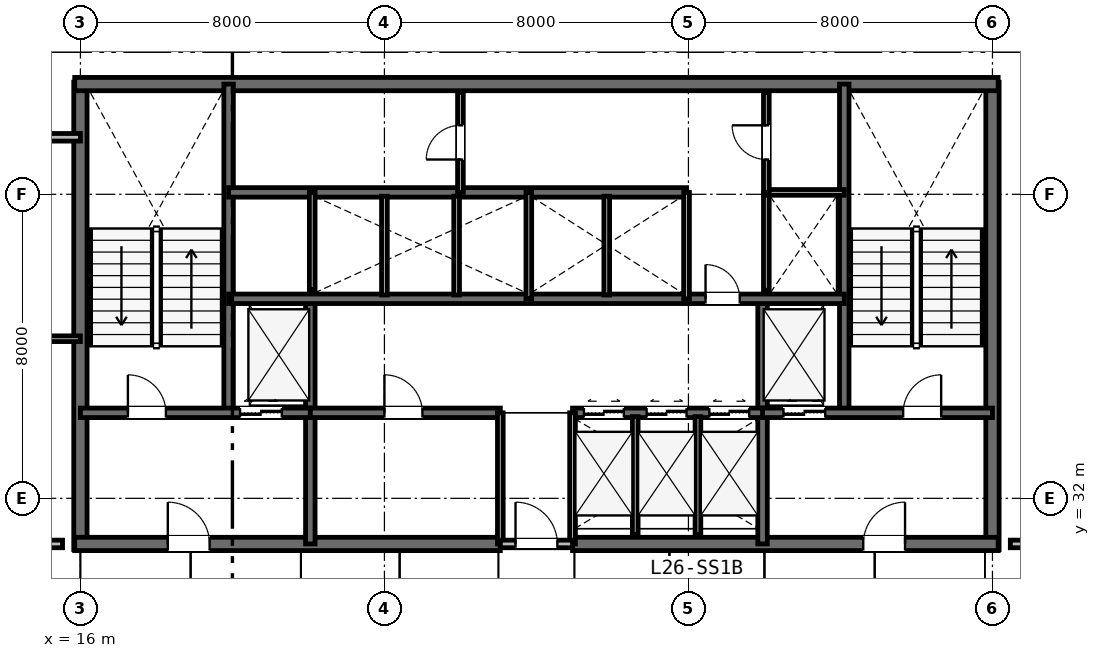
"""IFC4 building model, lengths in metres.
Left out: names, types, materials, properties, quantities, classifications, styles, units other than length and angle.
Written with IfcOpenShell. Run it as: python <this file> out.ifc"""

import sys

from ifc_helpers import new_model, si_unit, direction, frame, frame_2d, origin, place, context, subcontext, project, spatial, rectangle, extrude, element, fill, save


model = new_model("IFC4")
c1 = context("Model", 3, precision=1e-05, world=origin(), true_north=direction((0.0, 1.0)))
c2 = subcontext(c1, "Body", "Model", "MODEL_VIEW")
j1 = project(units=[si_unit("LENGTHUNIT", "METRE"), si_unit("PLANEANGLEUNIT", "RADIAN")], contexts=[c1])
p1 = place(None, origin())
s1 = spatial("IfcSite", under=j1, at=p1, CompositionType="ELEMENT")
p2 = place(p1, origin())
s2 = spatial("IfcBuilding", under=s1, at=p2, CompositionType="ELEMENT")
p3 = place(p2, frame((0.0, 0.0, 104.4)))
s3 = spatial("IfcBuildingStorey", under=s2, at=p3, CompositionType="ELEMENT", Elevation=104.4)
for number, where, z_axis, x_axis in (
    (1, (16.0, 30.65, 0.0), (0.0, 0.0, 1.0), (0.0, 1.0, 0.0)),
    (2, (40.0, 30.65, 0.0), (0.0, 0.0, 1.0), (0.0, 1.0, 0.0)),
):
    element("IfcWall", number, at=place(p3, frame(where, z_axis=z_axis, x_axis=x_axis)), inside=s3, PredefinedType="SHEAR", context=c2, shape_type="SweptSolid", body=[
        extrude(rectangle(XDim=12.3, YDim=0.35, at=frame_2d((6.15, 0.0))), origin(), (0.0, 0.0, 1.0), 3.6),
    ])
p4 = place(p3, frame((15.85, 42.9, 0.0), z_axis=(0.0, 0.0, 1.0), x_axis=(1.0, 0.0, 0.0)))
e3 = element("IfcWall", 3, at=p4, inside=s3, PredefinedType="SHEAR", context=c2, shape_type="SweptSolid", body=[
    extrude(rectangle(XDim=24.3, YDim=0.35, at=frame_2d((12.15, 0.0))), origin(), (0.0, 0.0, 1.0), 3.6),
])
p5 = place(p3, frame((15.85, 30.8, 0.0), z_axis=(0.0, 0.0, 1.0), x_axis=(1.0, 0.0, 0.0)))
e4 = element("IfcWall", 4, at=p5, inside=s3, PredefinedType="SHEAR", context=c2, shape_type="SweptSolid", body=[
    extrude(rectangle(XDim=11.2, YDim=0.35, at=frame_2d((5.6, 0.0))), origin(), (0.0, 0.0, 1.0), 3.6),
])
p6 = place(p5, frame((2.45, 0.0, 0.0)))
e5 = element("IfcOpeningElement", 5, at=p6, cuts=e4, PredefinedType="OPENING", context=c2, shape_type="SweptSolid", body=[
    extrude(rectangle(XDim=1.1, YDim=2.15, at=frame_2d((0.55, 1.075))), frame((0.0, 0.185, 0.0), z_axis=(0.0, -1.0, 0.0), x_axis=(1.0, 0.0, 0.0)), (0.0, 0.0, 1.0), 0.37),
])
p7 = place(p3, frame((28.95, 30.8, 0.0), z_axis=(0.0, 0.0, 1.0), x_axis=(1.0, 0.0, 0.0)))
e6 = element("IfcWall", 6, at=p7, inside=s3, PredefinedType="SHEAR", context=c2, shape_type="SweptSolid", body=[
    extrude(rectangle(XDim=11.2, YDim=0.35, at=frame_2d((5.6, 0.0))), origin(), (0.0, 0.0, 1.0), 3.6),
])
p8 = place(p7, frame((7.65, 0.0, 0.0)))
e7 = element("IfcOpeningElement", 7, at=p8, cuts=e6, PredefinedType="OPENING", context=c2, shape_type="SweptSolid", body=[
    extrude(rectangle(XDim=1.1, YDim=2.15, at=frame_2d((0.55, 1.075))), frame((0.0, 0.185, 0.0), z_axis=(0.0, -1.0, 0.0), x_axis=(1.0, 0.0, 0.0)), (0.0, 0.0, 1.0), 0.37),
])
for number, where, z_axis, x_axis in (
    (8, (19.9, 34.25, 0.0), (0.0, 0.0, 1.0), (0.0, 1.0, 0.0)),
    (9, (36.1, 34.25, 0.0), (0.0, 0.0, 1.0), (0.0, 1.0, 0.0)),
):
    element("IfcWall", number, at=place(p3, frame(where, z_axis=z_axis, x_axis=x_axis)), inside=s3, PredefinedType="SHEAR", context=c2, shape_type="SweptSolid", body=[
        extrude(rectangle(XDim=8.65, YDim=0.25, at=frame_2d((4.325, 0.0))), origin(), (0.0, 0.0, 1.0), 3.6),
    ])
for number, where, z_axis, x_axis in (
    (10, (22.05, 30.8, 0.0), (0.0, 0.0, 1.0), (0.0, 1.0, 0.0)),
    (11, (33.95, 30.8, 0.0), (0.0, 0.0, 1.0), (0.0, 1.0, 0.0)),
):
    element("IfcWall", number, at=place(p3, frame(where, z_axis=z_axis, x_axis=x_axis)), inside=s3, PredefinedType="SHEAR", context=c2, shape_type="SweptSolid", body=[
        extrude(rectangle(XDim=6.45, YDim=0.25, at=frame_2d((3.225, 0.0))), origin(), (0.0, 0.0, 1.0), 3.6),
    ])
p9 = place(p3, frame((16.0, 34.25, 0.0), z_axis=(0.0, 0.0, 1.0), x_axis=(1.0, 0.0, 0.0)))
e12 = element("IfcWall", 12, at=p9, inside=s3, PredefinedType="SHEAR", context=c2, shape_type="SweptSolid", body=[
    extrude(rectangle(XDim=6.05, YDim=0.25, at=frame_2d((3.025, 0.0))), origin(), (0.0, 0.0, 1.0), 3.6),
])
p10 = place(p9, frame((1.25, 0.0, 0.0)))
e13 = element("IfcOpeningElement", 13, at=p10, cuts=e12, PredefinedType="OPENING", context=c2, shape_type="SweptSolid", body=[
    extrude(rectangle(XDim=1.0, YDim=2.15, at=frame_2d((0.5, 1.075))), frame((0.0, 0.135, 0.0), z_axis=(0.0, -1.0, 0.0), x_axis=(1.0, 0.0, 0.0)), (0.0, 0.0, 1.0), 0.27),
])
p11 = place(p9, frame((4.2, 0.0, 0.0)))
e14 = element("IfcOpeningElement", 14, at=p11, cuts=e12, PredefinedType="OPENING", context=c2, shape_type="SweptSolid", body=[
    extrude(rectangle(XDim=1.1, YDim=2.15, at=frame_2d((0.55, 1.075))), frame((0.0, 0.135, 0.0), z_axis=(0.0, -1.0, 0.0), x_axis=(1.0, 0.0, 0.0)), (0.0, 0.0, 1.0), 0.27),
])
p12 = place(p3, frame((33.95, 34.25, 0.0), z_axis=(0.0, 0.0, 1.0), x_axis=(1.0, 0.0, 0.0)))
e15 = element("IfcWall", 15, at=p12, inside=s3, PredefinedType="SHEAR", context=c2, shape_type="SweptSolid", body=[
    extrude(rectangle(XDim=6.05, YDim=0.25, at=frame_2d((3.025, 0.0))), origin(), (0.0, 0.0, 1.0), 3.6),
])
p13 = place(p12, frame((3.7, 0.0, 0.0)))
e16 = element("IfcOpeningElement", 16, at=p13, cuts=e15, PredefinedType="OPENING", context=c2, shape_type="SweptSolid", body=[
    extrude(rectangle(XDim=1.0, YDim=2.15, at=frame_2d((0.5, 1.075))), frame((0.0, 0.135, 0.0), z_axis=(0.0, -1.0, 0.0), x_axis=(1.0, 0.0, 0.0)), (0.0, 0.0, 1.0), 0.27),
])
p14 = place(p12, frame((0.55, 0.0, 0.0)))
e17 = element("IfcOpeningElement", 17, at=p14, cuts=e15, PredefinedType="OPENING", context=c2, shape_type="SweptSolid", body=[
    extrude(rectangle(XDim=1.1, YDim=2.15, at=frame_2d((0.55, 1.075))), frame((0.0, 0.135, 0.0), z_axis=(0.0, -1.0, 0.0), x_axis=(1.0, 0.0, 0.0)), (0.0, 0.0, 1.0), 0.27),
])
p15 = place(p3, frame((22.05, 34.25, 0.0), z_axis=(0.0, 0.0, 1.0), x_axis=(1.0, 0.0, 0.0)))
e18 = element("IfcWall", 18, at=p15, inside=s3, PredefinedType="SHEAR", context=c2, shape_type="SweptSolid", body=[
    extrude(rectangle(XDim=5.0, YDim=0.25, at=frame_2d((2.5, 0.0))), origin(), (0.0, 0.0, 1.0), 3.6),
])
p16 = place(p15, frame((1.95, 0.0, 0.0)))
e19 = element("IfcOpeningElement", 19, at=p16, cuts=e18, PredefinedType="OPENING", context=c2, shape_type="SweptSolid", body=[
    extrude(rectangle(XDim=1.0, YDim=2.15, at=frame_2d((0.5, 1.075))), frame((0.0, 0.135, 0.0), z_axis=(0.0, -1.0, 0.0), x_axis=(1.0, 0.0, 0.0)), (0.0, 0.0, 1.0), 0.27),
])
p17 = place(p3, frame((28.95, 34.25, 0.0), z_axis=(0.0, 0.0, 1.0), x_axis=(1.0, 0.0, 0.0)))
e20 = element("IfcWall", 20, at=p17, inside=s3, PredefinedType="SHEAR", context=c2, shape_type="SweptSolid", body=[
    extrude(rectangle(XDim=5.0, YDim=0.25, at=frame_2d((2.5, 0.0))), origin(), (0.0, 0.0, 1.0), 3.6),
])
p18 = place(p17, frame((0.3, 0.0, 0.0)))
e21 = element("IfcOpeningElement", 21, at=p18, cuts=e20, PredefinedType="OPENING", context=c2, shape_type="SweptSolid", body=[
    extrude(rectangle(XDim=1.05, YDim=2.15, at=frame_2d((0.525, 1.075))), frame((0.0, 0.135, 0.0), z_axis=(0.0, -1.0, 0.0), x_axis=(1.0, 0.0, 0.0)), (0.0, 0.0, 1.0), 0.27),
])
p19 = place(p17, frame((1.95, 0.0, 0.0)))
e22 = element("IfcOpeningElement", 22, at=p19, cuts=e20, PredefinedType="OPENING", context=c2, shape_type="SweptSolid", body=[
    extrude(rectangle(XDim=1.05, YDim=2.15, at=frame_2d((0.525, 1.075))), frame((0.0, 0.135, 0.0), z_axis=(0.0, -1.0, 0.0), x_axis=(1.0, 0.0, 0.0)), (0.0, 0.0, 1.0), 0.27),
])
p20 = place(p17, frame((3.6, 0.0, 0.0)))
e23 = element("IfcOpeningElement", 23, at=p20, cuts=e20, PredefinedType="OPENING", context=c2, shape_type="SweptSolid", body=[
    extrude(rectangle(XDim=1.05, YDim=2.15, at=frame_2d((0.525, 1.075))), frame((0.0, 0.135, 0.0), z_axis=(0.0, -1.0, 0.0), x_axis=(1.0, 0.0, 0.0)), (0.0, 0.0, 1.0), 0.27),
])
p21 = place(p3, frame((19.9, 37.25, 0.0), z_axis=(0.0, 0.0, 1.0), x_axis=(1.0, 0.0, 0.0)))
e24 = element("IfcWall", 24, at=p21, inside=s3, PredefinedType="SHEAR", context=c2, shape_type="SweptSolid", body=[
    extrude(rectangle(XDim=16.2, YDim=0.25, at=frame_2d((8.1, 0.0))), origin(), (0.0, 0.0, 1.0), 3.6),
])
p22 = place(p21, frame((12.55, 0.0, 0.0)))
e25 = element("IfcOpeningElement", 25, at=p22, cuts=e24, PredefinedType="OPENING", context=c2, shape_type="SweptSolid", body=[
    extrude(rectangle(XDim=0.9, YDim=2.15, at=frame_2d((0.45, 1.075))), frame((0.0, 0.135, 0.0), z_axis=(0.0, -1.0, 0.0), x_axis=(1.0, 0.0, 0.0)), (0.0, 0.0, 1.0), 0.27),
])
p23 = place(p3, frame((19.9, 40.05, 0.0), z_axis=(0.0, 0.0, 1.0), x_axis=(1.0, 0.0, 0.0)))
e26 = element("IfcWall", 26, at=p23, inside=s3, PredefinedType="SHEAR", context=c2, shape_type="SweptSolid", body=[
    extrude(rectangle(XDim=12.05, YDim=0.25, at=frame_2d((6.025, 0.0))), origin(), (0.0, 0.0, 1.0), 3.6),
])
p24 = place(p3, frame((27.05, 30.8, 0.0), z_axis=(0.0, 0.0, 1.0), x_axis=(0.0, 1.0, 0.0)))
e27 = element("IfcWall", 27, at=p24, inside=s3, PredefinedType="PLUMBINGWALL", context=c2, shape_type="SweptSolid", body=[
    extrude(rectangle(XDim=3.45, YDim=0.15, at=frame_2d((1.725, 0.0))), origin(), (0.0, 0.0, 1.0), 3.01),
])
p25 = place(p3, frame((28.95, 30.8, 0.0), z_axis=(0.0, 0.0, 1.0), x_axis=(0.0, 1.0, 0.0)))
e28 = element("IfcWall", 28, at=p25, inside=s3, PredefinedType="PLUMBINGWALL", context=c2, shape_type="SweptSolid", body=[
    extrude(rectangle(XDim=3.45, YDim=0.15, at=frame_2d((1.725, 0.0))), origin(), (0.0, 0.0, 1.0), 3.33),
])
p26 = place(p3, frame((27.05, 30.8, 0.0), z_axis=(0.0, 0.0, 1.0), x_axis=(1.0, 0.0, 0.0)))
e29 = element("IfcWall", 29, at=p26, inside=s3, PredefinedType="PARTITIONING", context=c2, shape_type="SweptSolid", body=[
    extrude(rectangle(XDim=1.9, YDim=0.2, at=frame_2d((0.95, 0.0))), origin(), (0.0, 0.0, 1.0), 3.01),
])
p27 = place(p26, frame((0.4, 0.0, 0.0)))
e30 = element("IfcOpeningElement", 30, at=p27, cuts=e29, PredefinedType="OPENING", context=c2, shape_type="SweptSolid", body=[
    extrude(rectangle(XDim=1.1, YDim=2.15, at=frame_2d((0.55, 1.075))), frame((0.0, 0.11, 0.0), z_axis=(0.0, -1.0, 0.0), x_axis=(1.0, 0.0, 0.0)), (0.0, 0.0, 1.0), 0.22),
])
for number, where, z_axis, x_axis in (
    (31, (30.6, 31.05, 0.0), (0.0, 0.0, 1.0), (0.0, 1.0, 0.0)),
    (32, (32.25, 31.05, 0.0), (0.0, 0.0, 1.0), (0.0, 1.0, 0.0)),
):
    element("IfcWall", number, at=place(p3, frame(where, z_axis=z_axis, x_axis=x_axis)), inside=s3, PredefinedType="PLUMBINGWALL", context=c2, shape_type="SweptSolid", body=[
        extrude(rectangle(XDim=3.1, YDim=0.15, at=frame_2d((1.55, 0.0))), origin(), (0.0, 0.0, 1.0), 3.33),
    ])
p28 = place(p3, frame((22.1, 37.49, 0.0), z_axis=(0.0, 0.0, 1.0), x_axis=(0.0, 1.0, 0.0)))
e33 = element("IfcWall", 33, at=p28, inside=s3, PredefinedType="PLUMBINGWALL", context=c2, shape_type="SweptSolid", body=[
    extrude(rectangle(XDim=2.56, YDim=0.15, at=frame_2d((1.28, 0.0))), origin(), (0.0, 0.0, 1.0), 3.33),
])
p29 = place(p3, frame((27.8, 37.25, 0.0), z_axis=(0.0, 0.0, 1.0), x_axis=(0.0, 1.0, 0.0)))
e34 = element("IfcWall", 34, at=p29, inside=s3, PredefinedType="PLUMBINGWALL", context=c2, shape_type="SweptSolid", body=[
    extrude(rectangle(XDim=2.8, YDim=0.15, at=frame_2d((1.4, 0.0))), origin(), (0.0, 0.0, 1.0), 3.33),
])
for number, where, z_axis, x_axis in (
    (35, (24.0, 37.35, 0.0), (0.0, 0.0, 1.0), (0.0, 1.0, 0.0)),
    (36, (25.9, 37.35, 0.0), (0.0, 0.0, 1.0), (0.0, 1.0, 0.0)),
):
    element("IfcWall", number, at=place(p3, frame(where, z_axis=z_axis, x_axis=x_axis)), inside=s3, PredefinedType="PLUMBINGWALL", context=c2, shape_type="SweptSolid", body=[
        extrude(rectangle(XDim=2.6, YDim=0.15, at=frame_2d((1.3, 0.0))), origin(), (0.0, 0.0, 1.0), 3.33),
    ])
p30 = place(p3, frame((31.95, 37.25, 0.0), z_axis=(0.0, 0.0, 1.0), x_axis=(0.0, 1.0, 0.0)))
e37 = element("IfcWall", 37, at=p30, inside=s3, PredefinedType="PLUMBINGWALL", context=c2, shape_type="SweptSolid", body=[
    extrude(rectangle(XDim=2.8, YDim=0.15, at=frame_2d((1.4, 0.0))), origin(), (0.0, 0.0, 1.0), 3.33),
])
p31 = place(p3, frame((29.85, 37.35, 0.0), z_axis=(0.0, 0.0, 1.0), x_axis=(0.0, 1.0, 0.0)))
e38 = element("IfcWall", 38, at=p31, inside=s3, PredefinedType="PLUMBINGWALL", context=c2, shape_type="SweptSolid", body=[
    extrude(rectangle(XDim=2.6, YDim=0.15, at=frame_2d((1.3, 0.0))), origin(), (0.0, 0.0, 1.0), 3.33),
])
p32 = place(p3, frame((34.05, 37.473, 0.0), z_axis=(0.0, 0.0, 1.0), x_axis=(0.0, 1.0, 0.0)))
e39 = element("IfcWall", 39, at=p32, inside=s3, PredefinedType="PLUMBINGWALL", context=c2, shape_type="SweptSolid", body=[
    extrude(rectangle(XDim=2.577, YDim=0.15, at=frame_2d((1.288, 0.0))), origin(), (0.0, 0.0, 1.0), 3.33),
])
p33 = place(p3, frame((34.05, 40.05, 0.0), z_axis=(0.0, 0.0, 1.0), x_axis=(1.0, 0.0, 0.0)))
e40 = element("IfcWall", 40, at=p33, inside=s3, PredefinedType="PARTITIONING", context=c2, shape_type="SweptSolid", body=[
    extrude(rectangle(XDim=2.05, YDim=0.15, at=frame_2d((1.025, 0.0))), origin(), (0.0, 0.0, 1.0), 3.33),
])
p34 = place(p3, frame((34.05, 40.05, 0.0), z_axis=(0.0, 0.0, 1.0), x_axis=(0.0, 1.0, 0.0)))
e41 = element("IfcWall", 41, at=p34, inside=s3, PredefinedType="PARTITIONING", context=c2, shape_type="SweptSolid", body=[
    extrude(rectangle(XDim=2.63, YDim=0.15, at=frame_2d((1.315, 0.0))), origin(), (0.0, 0.0, 1.0), 3.33),
])
p35 = place(p34, frame((0.865, 0.0, 0.0)))
e42 = element("IfcOpeningElement", 42, at=p35, cuts=e41, PredefinedType="OPENING", context=c2, shape_type="SweptSolid", body=[
    extrude(rectangle(XDim=0.9, YDim=2.15, at=frame_2d((0.45, 1.075))), frame((0.0, 0.085, 0.0), z_axis=(0.0, -1.0, 0.0), x_axis=(1.0, 0.0, 0.0)), (0.0, 0.0, 1.0), 0.17),
])
p36 = place(p3, frame((26.0, 40.05, 0.0), z_axis=(0.0, 0.0, 1.0), x_axis=(0.0, 1.0, 0.0)))
e43 = element("IfcWall", 43, at=p36, inside=s3, PredefinedType="PARTITIONING", context=c2, shape_type="SweptSolid", body=[
    extrude(rectangle(XDim=2.63, YDim=0.15, at=frame_2d((1.315, 0.0))), origin(), (0.0, 0.0, 1.0), 3.33),
])
p37 = place(p36, frame((0.865, 0.0, 0.0)))
e44 = element("IfcOpeningElement", 44, at=p37, cuts=e43, PredefinedType="OPENING", context=c2, shape_type="SweptSolid", body=[
    extrude(rectangle(XDim=0.9, YDim=2.15, at=frame_2d((0.45, 1.075))), frame((0.0, 0.085, 0.0), z_axis=(0.0, -1.0, 0.0), x_axis=(1.0, 0.0, 0.0)), (0.0, 0.0, 1.0), 0.17),
])
p38 = place(p3, frame((11.4, 30.8, 0.0), z_axis=(0.0, 0.0, 1.0), x_axis=(1.0, 0.0, 0.0)))
e45 = element("IfcWall", 45, at=p38, inside=s3, PredefinedType="PARTITIONING", context=c2, shape_type="SweptSolid", body=[
    extrude(rectangle(XDim=4.13, YDim=0.2, at=frame_2d((2.065, 0.0))), origin(), (0.0, 0.0, 1.0), 2.87),
])
p39 = place(p3, frame((40.47, 30.8, 0.0), z_axis=(0.0, 0.0, 1.0), x_axis=(1.0, 0.0, 0.0)))
e46 = element("IfcWall", 46, at=p39, inside=s3, PredefinedType="PARTITIONING", context=c2, shape_type="SweptSolid", body=[
    extrude(rectangle(XDim=1.73, YDim=0.2, at=frame_2d((0.865, 0.0))), origin(), (0.0, 0.0, 1.0), 2.87),
])
p40 = place(p3, frame((0.1, 41.5, 0.0), z_axis=(0.0, 0.0, 1.0), x_axis=(1.0, 0.0, 0.0)))
e47 = element("IfcWall", 47, at=p40, inside=s3, PredefinedType="PARTITIONING", context=c2, shape_type="SweptSolid", body=[
    extrude(rectangle(XDim=15.9, YDim=0.2, at=frame_2d((7.95, 0.0))), origin(), (0.0, 0.0, 1.0), 2.87),
])
p41 = place(p40, frame((9.877, 0.0, 0.0)))
e48 = element("IfcOpeningElement", 48, at=p41, cuts=e47, PredefinedType="OPENING", context=c2, shape_type="SweptSolid", body=[
    extrude(rectangle(XDim=0.95, YDim=2.15, at=frame_2d((0.475, 1.075))), frame((0.0, 0.11, 0.0), z_axis=(0.0, -1.0, 0.0), x_axis=(1.0, 0.0, 0.0)), (0.0, 0.0, 1.0), 0.22),
])
p42 = place(p3, frame((11.4, 36.2, 0.0), z_axis=(0.0, 0.0, 1.0), x_axis=(1.0, 0.0, 0.0)))
e49 = element("IfcWall", 49, at=p42, inside=s3, PredefinedType="PARTITIONING", context=c2, shape_type="SweptSolid", body=[
    extrude(rectangle(XDim=4.6, YDim=0.15, at=frame_2d((2.3, 0.0))), origin(), (0.0, 0.0, 1.0), 3.33),
])
p43 = place(p27, origin())
e50 = element("IfcDoor", 50, at=p43, inside=s3, OperationType="SINGLE_SWING_LEFT", PredefinedType="DOOR", context=c2, shape_type="SweptSolid", body=[
    extrude(rectangle(XDim=1.1, YDim=2.15, at=frame_2d((0.55, 1.075))), frame((0.0, 0.025, 0.0), z_axis=(0.0, -1.0, 0.0), x_axis=(1.0, 0.0, 0.0)), (0.0, 0.0, 1.0), 0.05),
])
fill(e30, e50)
p44 = place(p10, origin())
e51 = element("IfcDoor", 51, at=p44, inside=s3, OperationType="SINGLE_SWING_LEFT", PredefinedType="DOOR", context=c2, shape_type="SweptSolid", body=[
    extrude(rectangle(XDim=1.0, YDim=2.15, at=frame_2d((0.5, 1.075))), frame((0.0, 0.025, 0.0), z_axis=(0.0, -1.0, 0.0), x_axis=(1.0, 0.0, 0.0)), (0.0, 0.0, 1.0), 0.05),
])
fill(e13, e51)
p45 = place(p13, origin())
e52 = element("IfcDoor", 52, at=p45, inside=s3, OperationType="SINGLE_SWING_RIGHT", PredefinedType="DOOR", context=c2, shape_type="SweptSolid", body=[
    extrude(rectangle(XDim=1.0, YDim=2.15, at=frame_2d((0.5, 1.075))), frame((0.0, 0.025, 0.0), z_axis=(0.0, -1.0, 0.0), x_axis=(1.0, 0.0, 0.0)), (0.0, 0.0, 1.0), 0.05),
])
fill(e16, e52)
p46 = place(p6, origin())
e53 = element("IfcDoor", 53, at=p46, inside=s3, OperationType="SINGLE_SWING_LEFT", PredefinedType="DOOR", context=c2, shape_type="SweptSolid", body=[
    extrude(rectangle(XDim=1.1, YDim=2.15, at=frame_2d((0.55, 1.075))), frame((0.0, 0.025, 0.0), z_axis=(0.0, -1.0, 0.0), x_axis=(1.0, 0.0, 0.0)), (0.0, 0.0, 1.0), 0.05),
])
fill(e5, e53)
p47 = place(p8, origin())
e54 = element("IfcDoor", 54, at=p47, inside=s3, OperationType="SINGLE_SWING_RIGHT", PredefinedType="DOOR", context=c2, shape_type="SweptSolid", body=[
    extrude(rectangle(XDim=1.1, YDim=2.15, at=frame_2d((0.55, 1.075))), frame((0.0, 0.025, 0.0), z_axis=(0.0, -1.0, 0.0), x_axis=(1.0, 0.0, 0.0)), (0.0, 0.0, 1.0), 0.05),
])
fill(e7, e54)
p48 = place(p16, origin())
e55 = element("IfcDoor", 55, at=p48, inside=s3, OperationType="SINGLE_SWING_LEFT", PredefinedType="DOOR", context=c2, shape_type="SweptSolid", body=[
    extrude(rectangle(XDim=1.0, YDim=2.15, at=frame_2d((0.5, 1.075))), frame((0.0, 0.025, 0.0), z_axis=(0.0, -1.0, 0.0), x_axis=(1.0, 0.0, 0.0)), (0.0, 0.0, 1.0), 0.05),
])
fill(e19, e55)
p49 = place(p22, origin())
e56 = element("IfcDoor", 56, at=p49, inside=s3, OperationType="SINGLE_SWING_LEFT", PredefinedType="DOOR", context=c2, shape_type="SweptSolid", body=[
    extrude(rectangle(XDim=0.9, YDim=2.15, at=frame_2d((0.45, 1.075))), frame((0.0, 0.025, 0.0), z_axis=(0.0, -1.0, 0.0), x_axis=(1.0, 0.0, 0.0)), (0.0, 0.0, 1.0), 0.05),
])
fill(e25, e56)
p50 = place(p35, origin())
e57 = element("IfcDoor", 57, at=p50, inside=s3, OperationType="SINGLE_SWING_RIGHT", PredefinedType="DOOR", context=c2, shape_type="SweptSolid", body=[
    extrude(rectangle(XDim=0.9, YDim=2.15, at=frame_2d((0.45, 1.075))), frame((0.0, 0.025, 0.0), z_axis=(0.0, -1.0, 0.0), x_axis=(1.0, 0.0, 0.0)), (0.0, 0.0, 1.0), 0.05),
])
fill(e42, e57)
p51 = place(p37, origin())
e58 = element("IfcDoor", 58, at=p51, inside=s3, OperationType="SINGLE_SWING_LEFT", PredefinedType="DOOR", context=c2, shape_type="SweptSolid", body=[
    extrude(rectangle(XDim=0.9, YDim=2.15, at=frame_2d((0.45, 1.075))), frame((0.0, 0.025, 0.0), z_axis=(0.0, -1.0, 0.0), x_axis=(1.0, 0.0, 0.0)), (0.0, 0.0, 1.0), 0.05),
])
fill(e44, e58)
p52 = place(p11, origin())
e59 = element("IfcDoor", 59, at=p52, inside=s3, OperationType="DOUBLE_DOOR_SLIDING", PredefinedType="DOOR", context=c2, shape_type="SweptSolid", body=[
    extrude(rectangle(XDim=1.1, YDim=2.15, at=frame_2d((0.55, 1.075))), frame((0.0, 0.025, 0.0), z_axis=(0.0, -1.0, 0.0), x_axis=(1.0, 0.0, 0.0)), (0.0, 0.0, 1.0), 0.05),
])
fill(e14, e59)
p53 = place(p14, origin())
e60 = element("IfcDoor", 60, at=p53, inside=s3, OperationType="DOUBLE_DOOR_SLIDING", PredefinedType="DOOR", context=c2, shape_type="SweptSolid", body=[
    extrude(rectangle(XDim=1.1, YDim=2.15, at=frame_2d((0.55, 1.075))), frame((0.0, 0.025, 0.0), z_axis=(0.0, -1.0, 0.0), x_axis=(1.0, 0.0, 0.0)), (0.0, 0.0, 1.0), 0.05),
])
fill(e17, e60)
p54 = place(p18, origin())
e61 = element("IfcDoor", 61, at=p54, inside=s3, OperationType="DOUBLE_DOOR_SLIDING", PredefinedType="DOOR", context=c2, shape_type="SweptSolid", body=[
    extrude(rectangle(XDim=1.05, YDim=2.15, at=frame_2d((0.525, 1.075))), frame((0.0, 0.025, 0.0), z_axis=(0.0, -1.0, 0.0), x_axis=(1.0, 0.0, 0.0)), (0.0, 0.0, 1.0), 0.05),
])
fill(e21, e61)
p55 = place(p19, origin())
e62 = element("IfcDoor", 62, at=p55, inside=s3, OperationType="DOUBLE_DOOR_SLIDING", PredefinedType="DOOR", context=c2, shape_type="SweptSolid", body=[
    extrude(rectangle(XDim=1.05, YDim=2.15, at=frame_2d((0.525, 1.075))), frame((0.0, 0.025, 0.0), z_axis=(0.0, -1.0, 0.0), x_axis=(1.0, 0.0, 0.0)), (0.0, 0.0, 1.0), 0.05),
])
fill(e22, e62)
p56 = place(p20, origin())
e63 = element("IfcDoor", 63, at=p56, inside=s3, OperationType="DOUBLE_DOOR_SLIDING", PredefinedType="DOOR", context=c2, shape_type="SweptSolid", body=[
    extrude(rectangle(XDim=1.05, YDim=2.15, at=frame_2d((0.525, 1.075))), frame((0.0, 0.025, 0.0), z_axis=(0.0, -1.0, 0.0), x_axis=(1.0, 0.0, 0.0)), (0.0, 0.0, 1.0), 0.05),
])
fill(e23, e63)
save(model, sys.argv[1])
